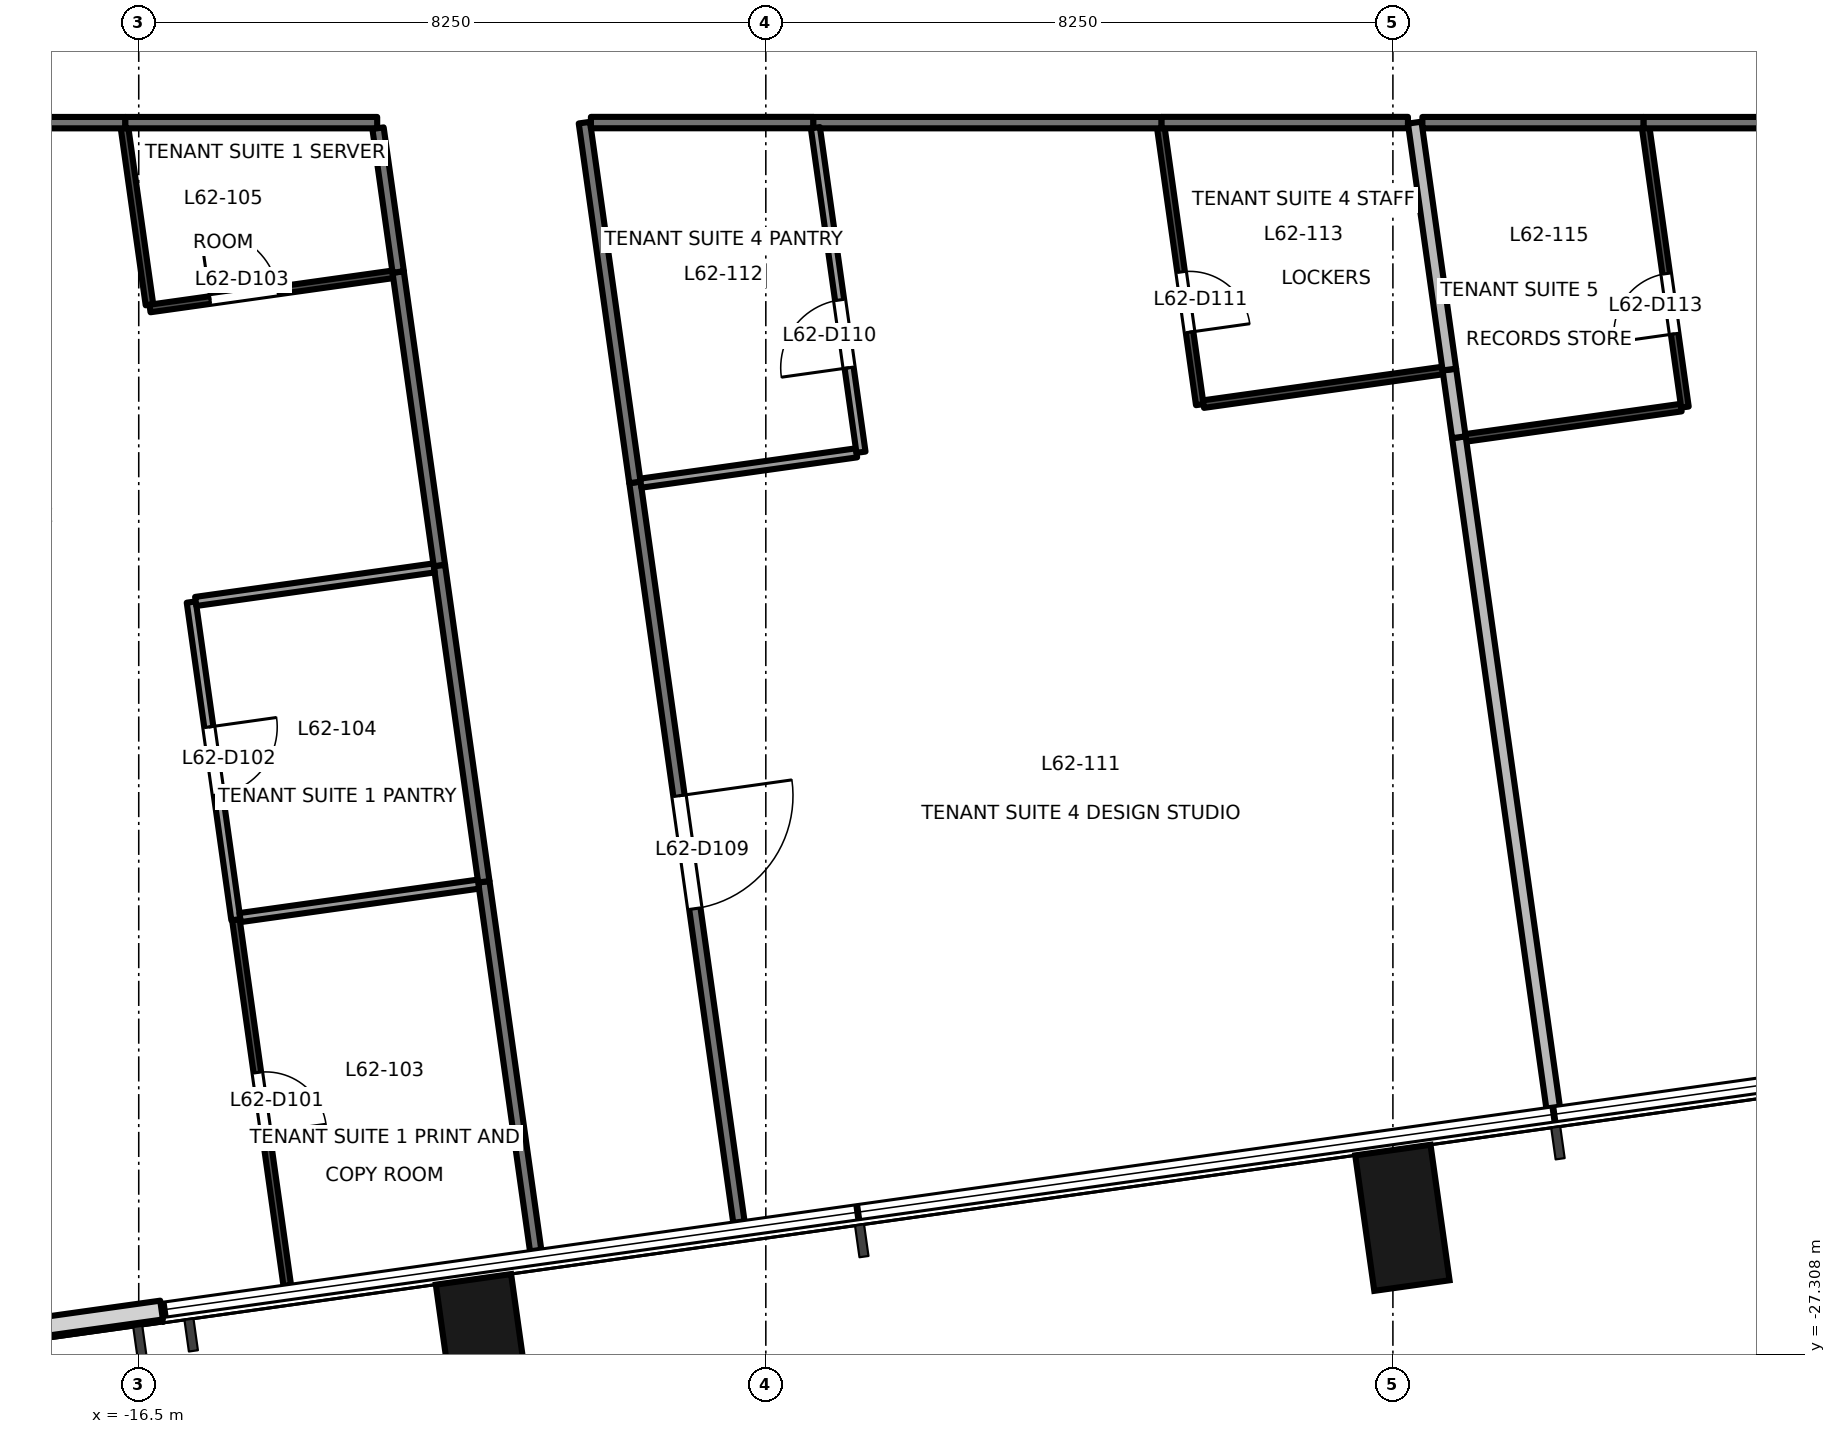
"""IFC4 building model, lengths in metres.
Left out: names, types, materials, properties, quantities, classifications, styles, units other than length and angle.
Written with IfcOpenShell. Run it as: python <this file> out.ifc"""

import sys

from ifc_helpers import new_model, si_unit, direction, frame, frame_2d, origin, origin_2d, place, context, subcontext, project, spatial, rectangle, extrude, element, fill, save


model = new_model("IFC4")
c1 = context("Model", 3, precision=1e-05, world=origin(), true_north=direction((0.0, 1.0)))
c2 = subcontext(c1, "Body", "Model", "MODEL_VIEW")
j1 = project(units=[si_unit("LENGTHUNIT", "METRE"), si_unit("PLANEANGLEUNIT", "RADIAN")], contexts=[c1])
p1 = place(None, origin())
s1 = spatial("IfcSite", under=j1, at=p1, CompositionType="ELEMENT")
p2 = place(p1, origin())
s2 = spatial("IfcBuilding", under=s1, at=p2, CompositionType="ELEMENT")
p3 = place(p2, frame((0.0, 0.0, 270.7)))
s3 = spatial("IfcBuildingStorey", under=s2, at=p3, CompositionType="ELEMENT", Elevation=270.7)
for number, where, z_axis, x_axis in (
    (1, (-11.971, -27.209, -0.2), (0.0, 0.0, 1.0), (0.99, 0.139, 0.0)),
    (2, (0.125, -25.508, -0.2), (0.0, 0.0, 1.0), (0.99, 0.139, 0.0)),
):
    element("IfcColumn", number, at=place(p3, frame(where, z_axis=z_axis, x_axis=x_axis)), inside=s3, PredefinedType="COLUMN", context=c2, shape_type="SweptSolid", body=[
        extrude(rectangle(XDim=1.0, YDim=1.8, at=origin_2d()), origin(), (0.0, 0.0, 1.0), 3.9),
    ])
p4 = place(p3, frame((-19.125, -27.132, 0.0), z_axis=(0.0, 0.0, 1.0), x_axis=(0.990291981483, 0.139002846771, 0.0)))
e3 = element("IfcWall", 3, at=p4, inside=s3, PredefinedType="SOLIDWALL", context=c2, shape_type="SweptSolid", body=[
    extrude(rectangle(XDim=2.954, YDim=0.25, at=frame_2d((1.477, 0.0))), origin(), (0.0, 0.0, 1.0), 3.7),
])
p5 = place(p3, frame((-16.676, -11.1, 0.0), z_axis=(0.0, 0.0, 1.0), x_axis=(-1.0, 0.0, 0.0)))
e4 = element("IfcWall", 4, at=p5, inside=s3, PredefinedType="PARTITIONING", context=c2, shape_type="SweptSolid", body=[
    extrude(rectangle(XDim=4.024, YDim=0.15, at=frame_2d((2.012, 0.0))), origin(), (0.0, 0.0, 1.0), 3.7),
])
p6 = place(p5, frame((1.562, 0.0, 0.0)))
e5 = element("IfcOpeningElement", 5, at=p6, cuts=e4, PredefinedType="OPENING", context=c2, shape_type="SweptSolid", body=[
    extrude(rectangle(XDim=0.9, YDim=2.1, at=frame_2d((0.45, 1.05))), frame((0.0, 0.085, 0.0), z_axis=(0.0, -1.0, 0.0), x_axis=(1.0, 0.0, 0.0)), (0.0, 0.0, 1.0), 0.171),
])
p7 = place(p3, frame((-12.544, -16.928, 0.0), z_axis=(0.0, 0.0, 1.0), x_axis=(-0.139221261089, 0.990261299083, 0.0)))
e6 = element("IfcWall", 6, at=p7, inside=s3, PredefinedType="PARTITIONING", context=c2, shape_type="SweptSolid", body=[
    extrude(rectangle(XDim=3.9, YDim=0.15, at=frame_2d((1.95, 0.0))), origin(), (0.0, 0.0, 1.0), 3.7),
])
p8 = place(p3, frame((-11.278, -25.939, 0.0), z_axis=(0.0, 0.0, 1.0), x_axis=(-0.139167797017, 0.990268814148, 0.0)))
e7 = element("IfcWall", 7, at=p8, inside=s3, PredefinedType="PARTITIONING", context=c2, shape_type="SweptSolid", body=[
    extrude(rectangle(XDim=4.9, YDim=0.15, at=frame_2d((2.45, 0.0))), origin(), (0.0, 0.0, 1.0), 3.7),
])
p9 = place(p3, frame((-11.96, -21.087, 0.0), z_axis=(0.0, 0.0, 1.0), x_axis=(-0.139052638616, 0.990284991148, 0.0)))
e8 = element("IfcWall", 8, at=p9, inside=s3, PredefinedType="PARTITIONING", context=c2, shape_type="SweptSolid", body=[
    extrude(rectangle(XDim=4.2, YDim=0.15, at=frame_2d((2.1, 0.0))), origin(), (0.0, 0.0, 1.0), 3.7),
])
p10 = place(p3, frame((-13.363, -11.1, 0.0), z_axis=(0.0, 0.0, 1.0), x_axis=(-1.0, 0.0, 0.0)))
e9 = element("IfcWall", 9, at=p10, inside=s3, PredefinedType="PARTITIONING", context=c2, shape_type="SweptSolid", body=[
    extrude(rectangle(XDim=3.313, YDim=0.15, at=frame_2d((1.656, 0.0))), origin(), (0.0, 0.0, 1.0), 2.8),
])
p11 = place(p3, frame((-13.086, -13.065, 0.0), z_axis=(0.0, 0.0, 1.0), x_axis=(-0.139292033523, 0.990251346577, 0.0)))
e10 = element("IfcWall", 10, at=p11, inside=s3, PredefinedType="PARTITIONING", context=c2, shape_type="SweptSolid", body=[
    extrude(rectangle(XDim=1.91, YDim=0.15, at=frame_2d((0.955, 0.0))), origin(), (0.0, 0.0, 1.0), 2.8),
])
p12 = place(p3, frame((-9.972, -15.833, 0.0), z_axis=(0.0, 0.0, 1.0), x_axis=(0.139205343882, -0.990263536759, 0.0)))
e11 = element("IfcWall", 11, at=p12, inside=s3, PredefinedType="PARTITIONING", context=c2, shape_type="SweptSolid", body=[
    extrude(rectangle(XDim=9.827, YDim=0.15, at=frame_2d((4.913, 0.0))), origin(), (0.0, 0.0, 1.0), 2.8),
])
p13 = place(p12, frame((4.163, 0.0, 0.0)))
e12 = element("IfcOpeningElement", 12, at=p13, cuts=e11, PredefinedType="OPENING", context=c2, shape_type="SweptSolid", body=[
    extrude(rectangle(XDim=1.5, YDim=2.1, at=frame_2d((0.75, 1.05))), frame((0.0, 0.085, 0.0), z_axis=(0.0, -1.0, 0.0), x_axis=(1.0, 0.0, 0.0)), (0.0, 0.0, 1.0), 0.171),
])
p14 = place(p3, frame((-3.043, -11.1, 0.0), z_axis=(0.0, 0.0, 1.0), x_axis=(-1.0, 0.0, 0.0)))
e13 = element("IfcWall", 13, at=p14, inside=s3, PredefinedType="PARTITIONING", context=c2, shape_type="SweptSolid", body=[
    extrude(rectangle(XDim=4.584, YDim=0.15, at=frame_2d((2.292, 0.0))), origin(), (0.0, 0.0, 1.0), 2.8),
])
p15 = place(p3, frame((-10.637, -11.1, 0.0), z_axis=(0.0, 0.0, 1.0), x_axis=(0.139146821365, -0.990271761742, 0.0)))
e14 = element("IfcWall", 14, at=p15, inside=s3, PredefinedType="PARTITIONING", context=c2, shape_type="SweptSolid", body=[
    extrude(rectangle(XDim=4.779, YDim=0.15, at=frame_2d((2.39, 0.0))), origin(), (0.0, 0.0, 1.0), 3.7),
])
p16 = place(p3, frame((-7.627, -11.099, 0.0), z_axis=(0.0, 0.0, 1.0), x_axis=(-1.0, 0.0, 0.0)))
e15 = element("IfcWall", 15, at=p16, inside=s3, PredefinedType="PARTITIONING", context=c2, shape_type="SweptSolid", body=[
    extrude(rectangle(XDim=2.924, YDim=0.15, at=frame_2d((1.462, 0.0))), origin(), (0.0, 0.0, 1.0), 2.8),
])
p17 = place(p3, frame((0.198, -11.099, 0.0), z_axis=(0.0, 0.0, 1.0), x_axis=(-1.0, 0.0, 0.0)))
e16 = element("IfcWall", 16, at=p17, inside=s3, PredefinedType="PARTITIONING", context=c2, shape_type="SweptSolid", body=[
    extrude(rectangle(XDim=3.241, YDim=0.15, at=frame_2d((1.621, 0.0))), origin(), (0.0, 0.0, 1.0), 2.9),
])
p18 = place(p3, frame((10.563, -11.1, 0.0), z_axis=(0.0, 0.0, 1.0), x_axis=(-1.0, 0.0, 0.0)))
e17 = element("IfcWall", 17, at=p18, inside=s3, PredefinedType="PARTITIONING", context=c2, shape_type="SweptSolid", body=[
    extrude(rectangle(XDim=7.267, YDim=0.15, at=frame_2d((3.634, 0.0))), origin(), (0.0, 0.0, 1.0), 2.9),
])
p19 = place(p3, frame((3.296, -11.1, 0.0), z_axis=(0.0, 0.0, 1.0), x_axis=(-1.0, 0.0, 0.0)))
e18 = element("IfcWall", 18, at=p19, inside=s3, PredefinedType="PARTITIONING", context=c2, shape_type="SweptSolid", body=[
    extrude(rectangle(XDim=2.908, YDim=0.15, at=frame_2d((1.454, 0.0))), origin(), (0.0, 0.0, 1.0), 3.7),
])
p20 = place(p3, frame((-15.222, -21.586, 0.0), z_axis=(0.0, 0.0, 1.0), x_axis=(0.139120882778, -0.990275406124, 0.0)))
e19 = element("IfcWall", 19, at=p20, inside=s3, PredefinedType="PARTITIONING", context=c2, shape_type="SweptSolid", body=[
    extrude(rectangle(XDim=4.859, YDim=0.1, at=frame_2d((2.43, 0.0))), origin(), (0.0, 0.0, 1.0), 3.7),
])
p21 = place(p20, frame((2.03, 0.0, 0.0)))
e20 = element("IfcOpeningElement", 20, at=p21, cuts=e19, PredefinedType="OPENING", context=c2, shape_type="SweptSolid", body=[
    extrude(rectangle(XDim=0.8, YDim=2.1, at=frame_2d((0.4, 1.05))), frame((0.0, 0.061, 0.0), z_axis=(0.0, -1.0, 0.0), x_axis=(1.0, 0.0, 0.0)), (0.0, 0.0, 1.0), 0.121),
])
p22 = place(p3, frame((-15.809, -17.407, 0.0), z_axis=(0.0, 0.0, 1.0), x_axis=(0.139136935655, -0.99027315077, 0.0)))
e21 = element("IfcWall", 21, at=p22, inside=s3, PredefinedType="PARTITIONING", context=c2, shape_type="SweptSolid", body=[
    extrude(rectangle(XDim=4.22, YDim=0.12, at=frame_2d((2.11, 0.0))), origin(), (0.0, 0.0, 1.0), 3.7),
])
p23 = place(p22, frame((1.66, 0.0, 0.0)))
e22 = element("IfcOpeningElement", 22, at=p23, cuts=e21, PredefinedType="OPENING", context=c2, shape_type="SweptSolid", body=[
    extrude(rectangle(XDim=0.9, YDim=2.1, at=frame_2d((0.45, 1.05))), frame((0.0, 0.071, 0.0), z_axis=(0.0, -1.0, 0.0), x_axis=(1.0, 0.0, 0.0)), (0.0, 0.0, 1.0), 0.141),
])
p24 = place(p3, frame((-12.615, -16.958, 0.0), z_axis=(0.0, 0.0, 1.0), x_axis=(-0.990254086283, -0.139272555084, 0.0)))
e23 = element("IfcWall", 23, at=p24, inside=s3, PredefinedType="PARTITIONING", context=c2, shape_type="SweptSolid", body=[
    extrude(rectangle(XDim=3.166, YDim=0.12, at=frame_2d((1.583, 0.0))), origin(), (0.0, 0.0, 1.0), 2.8),
])
p25 = place(p3, frame((-16.687, -11.168, 0.0), z_axis=(0.0, 0.0, 1.0), x_axis=(0.139560302367, -0.990213573934, 0.0)))
e24 = element("IfcWall", 24, at=p25, inside=s3, PredefinedType="PARTITIONING", context=c2, shape_type="SweptSolid", body=[
    extrude(rectangle(XDim=2.351, YDim=0.1, at=frame_2d((1.176, 0.0))), origin(), (0.0, 0.0, 1.0), 3.7),
])
p26 = place(p3, frame((-16.352, -13.545, 0.0), z_axis=(0.0, 0.0, 1.0), x_axis=(0.990264894561, 0.13919568456, 0.0)))
e25 = element("IfcWall", 25, at=p26, inside=s3, PredefinedType="PARTITIONING", context=c2, shape_type="SweptSolid", body=[
    extrude(rectangle(XDim=3.226, YDim=0.1, at=frame_2d((1.613, 0.0))), origin(), (0.0, 0.0, 1.0), 2.8),
])
p27 = place(p26, frame((0.798, 0.0, 0.0)))
e26 = element("IfcOpeningElement", 26, at=p27, cuts=e25, PredefinedType="OPENING", context=c2, shape_type="SweptSolid", body=[
    extrude(rectangle(XDim=0.9, YDim=2.1, at=frame_2d((0.45, 1.05))), frame((0.0, 0.061, 0.0), z_axis=(0.0, -1.0, 0.0), x_axis=(1.0, 0.0, 0.0)), (0.0, 0.0, 1.0), 0.121),
])
p28 = place(p3, frame((-15.166, -21.558, 0.0), z_axis=(0.0, 0.0, 1.0), x_axis=(0.990285967974, 0.139045681821, 0.0)))
e27 = element("IfcWall", 27, at=p28, inside=s3, PredefinedType="PARTITIONING", context=c2, shape_type="SweptSolid", body=[
    extrude(rectangle(XDim=3.166, YDim=0.12, at=frame_2d((1.583, 0.0))), origin(), (0.0, 0.0, 1.0), 2.8),
])
p29 = place(p3, frame((-9.895, -15.843, 0.0), z_axis=(0.0, 0.0, 1.0), x_axis=(0.990265570358, 0.139190876728, 0.0)))
e28 = element("IfcWall", 28, at=p29, inside=s3, PredefinedType="PARTITIONING", context=c2, shape_type="SweptSolid", body=[
    extrude(rectangle(XDim=2.866, YDim=0.12, at=frame_2d((1.433, 0.0))), origin(), (0.0, 0.0, 1.0), 2.8),
])
p30 = place(p3, frame((-6.998, -15.436, 0.0), z_axis=(0.0, 0.0, 1.0), x_axis=(-0.139145497857, 0.990271947712, 0.0)))
e29 = element("IfcWall", 29, at=p30, inside=s3, PredefinedType="PARTITIONING", context=c2, shape_type="SweptSolid", body=[
    extrude(rectangle(XDim=4.311, YDim=0.12, at=frame_2d((2.156, 0.0))), origin(), (0.0, 0.0, 1.0), 3.7),
])
p31 = place(p30, frame((1.123, 0.0, 0.0)))
e30 = element("IfcOpeningElement", 30, at=p31, cuts=e29, PredefinedType="OPENING", context=c2, shape_type="SweptSolid", body=[
    extrude(rectangle(XDim=0.9, YDim=2.1, at=frame_2d((0.45, 1.05))), frame((0.0, 0.071, 0.0), z_axis=(0.0, -1.0, 0.0), x_axis=(1.0, 0.0, 0.0)), (0.0, 0.0, 1.0), 0.141),
])
p32 = place(p3, frame((-3.053, -11.168, 0.0), z_axis=(0.0, 0.0, 1.0), x_axis=(0.139199908751, -0.990264300782, 0.0)))
e31 = element("IfcWall", 31, at=p32, inside=s3, PredefinedType="PARTITIONING", context=c2, shape_type="SweptSolid", body=[
    extrude(rectangle(XDim=3.678, YDim=0.1, at=frame_2d((1.839, 0.0))), origin(), (0.0, 0.0, 1.0), 3.7),
])
p33 = place(p32, frame((1.915, 0.0, 0.0)))
e32 = element("IfcOpeningElement", 32, at=p33, cuts=e31, PredefinedType="OPENING", context=c2, shape_type="SweptSolid", body=[
    extrude(rectangle(XDim=0.8, YDim=2.1, at=frame_2d((0.4, 1.05))), frame((0.0, 0.061, 0.0), z_axis=(0.0, -1.0, 0.0), x_axis=(1.0, 0.0, 0.0)), (0.0, 0.0, 1.0), 0.121),
])
p34 = place(p3, frame((-2.492, -14.803, 0.0), z_axis=(0.0, 0.0, 1.0), x_axis=(0.990278754473, 0.139097046841, 0.0)))
e33 = element("IfcWall", 33, at=p34, inside=s3, PredefinedType="PARTITIONING", context=c2, shape_type="SweptSolid", body=[
    extrude(rectangle(XDim=3.177, YDim=0.1, at=frame_2d((1.588, 0.0))), origin(), (0.0, 0.0, 1.0), 2.9),
])
p35 = place(p3, frame((0.868, -15.239, 0.0), z_axis=(0.0, 0.0, 1.0), x_axis=(0.139233409815, -0.990259591012, 0.0)))
e34 = element("IfcWall", 34, at=p35, inside=s3, PredefinedType="PARTITIONING", context=c2, shape_type="SweptSolid", body=[
    extrude(rectangle(XDim=8.906, YDim=0.18, at=frame_2d((4.453, 0.0))), origin(), (0.0, 0.0, 1.0), 3.7),
])
p36 = place(p3, frame((0.743, -14.349, 0.0), z_axis=(0.0, 0.0, 1.0), x_axis=(0.139100809785, -0.990278225913, 0.0)))
e35 = element("IfcWall", 35, at=p36, inside=s3, PredefinedType="PARTITIONING", context=c2, shape_type="SweptSolid", body=[
    extrude(rectangle(XDim=0.899, YDim=0.18, at=frame_2d((0.449, 0.0))), origin(), (0.0, 0.0, 1.0), 3.7),
])
p37 = place(p3, frame((0.287, -11.1, 0.0), z_axis=(0.0, 0.0, 1.0), x_axis=(0.13898222456, -0.990294875911, 0.0)))
e36 = element("IfcWall", 36, at=p37, inside=s3, PredefinedType="PARTITIONING", context=c2, shape_type="SweptSolid", body=[
    extrude(rectangle(XDim=3.28, YDim=0.18, at=frame_2d((1.64, 0.0))), origin(), (0.0, 0.0, 1.0), 3.7),
])
p38 = place(p3, frame((0.96, -15.247, 0.0), z_axis=(0.0, 0.0, 1.0), x_axis=(0.990271288443, 0.139150189669, 0.0)))
e37 = element("IfcWall", 37, at=p38, inside=s3, PredefinedType="PARTITIONING", context=c2, shape_type="SweptSolid", body=[
    extrude(rectangle(XDim=2.86, YDim=0.1, at=frame_2d((1.43, 0.0))), origin(), (0.0, 0.0, 1.0), 3.7),
])
p39 = place(p3, frame((3.842, -14.842, 0.0), z_axis=(0.0, 0.0, 1.0), x_axis=(-0.139108634852, 0.990277126722, 0.0)))
e38 = element("IfcWall", 38, at=p39, inside=s3, PredefinedType="PARTITIONING", context=c2, shape_type="SweptSolid", body=[
    extrude(rectangle(XDim=3.71, YDim=0.1, at=frame_2d((1.855, 0.0))), origin(), (0.0, 0.0, 1.0), 3.7),
])
p40 = place(p39, frame((0.973, 0.0, 0.0)))
e39 = element("IfcOpeningElement", 39, at=p40, cuts=e38, PredefinedType="OPENING", context=c2, shape_type="SweptSolid", body=[
    extrude(rectangle(XDim=0.8, YDim=2.1, at=frame_2d((0.4, 1.05))), frame((0.0, 0.061, 0.0), z_axis=(0.0, -1.0, 0.0), x_axis=(1.0, 0.0, 0.0)), (0.0, 0.0, 1.0), 0.121),
])
p41 = place(p21, origin())
e40 = element("IfcDoor", 40, at=p41, inside=s3, OperationType="SINGLE_SWING_RIGHT", PredefinedType="DOOR", context=c2, shape_type="SweptSolid", body=[
    extrude(rectangle(XDim=0.8, YDim=2.1, at=frame_2d((0.4, 1.05))), frame((0.0, 0.025, 0.0), z_axis=(0.0, -1.0, 0.0), x_axis=(1.0, 0.0, 0.0)), (0.0, 0.0, 1.0), 0.05),
])
fill(e20, e40)
p42 = place(p23, origin())
e41 = element("IfcDoor", 41, at=p42, inside=s3, OperationType="SINGLE_SWING_LEFT", PredefinedType="DOOR", context=c2, shape_type="SweptSolid", body=[
    extrude(rectangle(XDim=0.9, YDim=2.1, at=frame_2d((0.45, 1.05))), frame((0.0, 0.025, 0.0), z_axis=(0.0, -1.0, 0.0), x_axis=(1.0, 0.0, 0.0)), (0.0, 0.0, 1.0), 0.05),
])
fill(e22, e41)
p43 = place(p27, origin())
e42 = element("IfcDoor", 42, at=p43, inside=s3, OperationType="SINGLE_SWING_LEFT", PredefinedType="DOOR", context=c2, shape_type="SweptSolid", body=[
    extrude(rectangle(XDim=0.9, YDim=2.1, at=frame_2d((0.45, 1.05))), frame((0.0, 0.025, 0.0), z_axis=(0.0, -1.0, 0.0), x_axis=(1.0, 0.0, 0.0)), (0.0, 0.0, 1.0), 0.05),
])
fill(e26, e42)
p44 = place(p13, origin())
e43 = element("IfcDoor", 43, at=p44, inside=s3, OperationType="DOUBLE_DOOR_SINGLE_SWING", PredefinedType="DOOR", context=c2, shape_type="SweptSolid", body=[
    extrude(rectangle(XDim=1.5, YDim=2.1, at=frame_2d((0.75, 1.05))), frame((0.0, 0.025, 0.0), z_axis=(0.0, -1.0, 0.0), x_axis=(1.0, 0.0, 0.0)), (0.0, 0.0, 1.0), 0.05),
])
fill(e12, e43)
p45 = place(p31, origin())
e44 = element("IfcDoor", 44, at=p45, inside=s3, OperationType="SINGLE_SWING_LEFT", PredefinedType="DOOR", context=c2, shape_type="SweptSolid", body=[
    extrude(rectangle(XDim=0.9, YDim=2.1, at=frame_2d((0.45, 1.05))), frame((0.0, 0.025, 0.0), z_axis=(0.0, -1.0, 0.0), x_axis=(1.0, 0.0, 0.0)), (0.0, 0.0, 1.0), 0.05),
])
fill(e30, e44)
p46 = place(p33, origin())
e45 = element("IfcDoor", 45, at=p46, inside=s3, OperationType="SINGLE_SWING_RIGHT", PredefinedType="DOOR", context=c2, shape_type="SweptSolid", body=[
    extrude(rectangle(XDim=0.8, YDim=2.1, at=frame_2d((0.4, 1.05))), frame((0.0, 0.025, 0.0), z_axis=(0.0, -1.0, 0.0), x_axis=(1.0, 0.0, 0.0)), (0.0, 0.0, 1.0), 0.05),
])
fill(e32, e45)
p47 = place(p40, origin())
e46 = element("IfcDoor", 46, at=p47, inside=s3, OperationType="SINGLE_SWING_LEFT", PredefinedType="DOOR", context=c2, shape_type="SweptSolid", body=[
    extrude(rectangle(XDim=0.8, YDim=2.1, at=frame_2d((0.4, 1.05))), frame((0.0, 0.025, 0.0), z_axis=(0.0, -1.0, 0.0), x_axis=(1.0, 0.0, 0.0)), (0.0, 0.0, 1.0), 0.05),
])
fill(e39, e46)
save(model, sys.argv[1])
